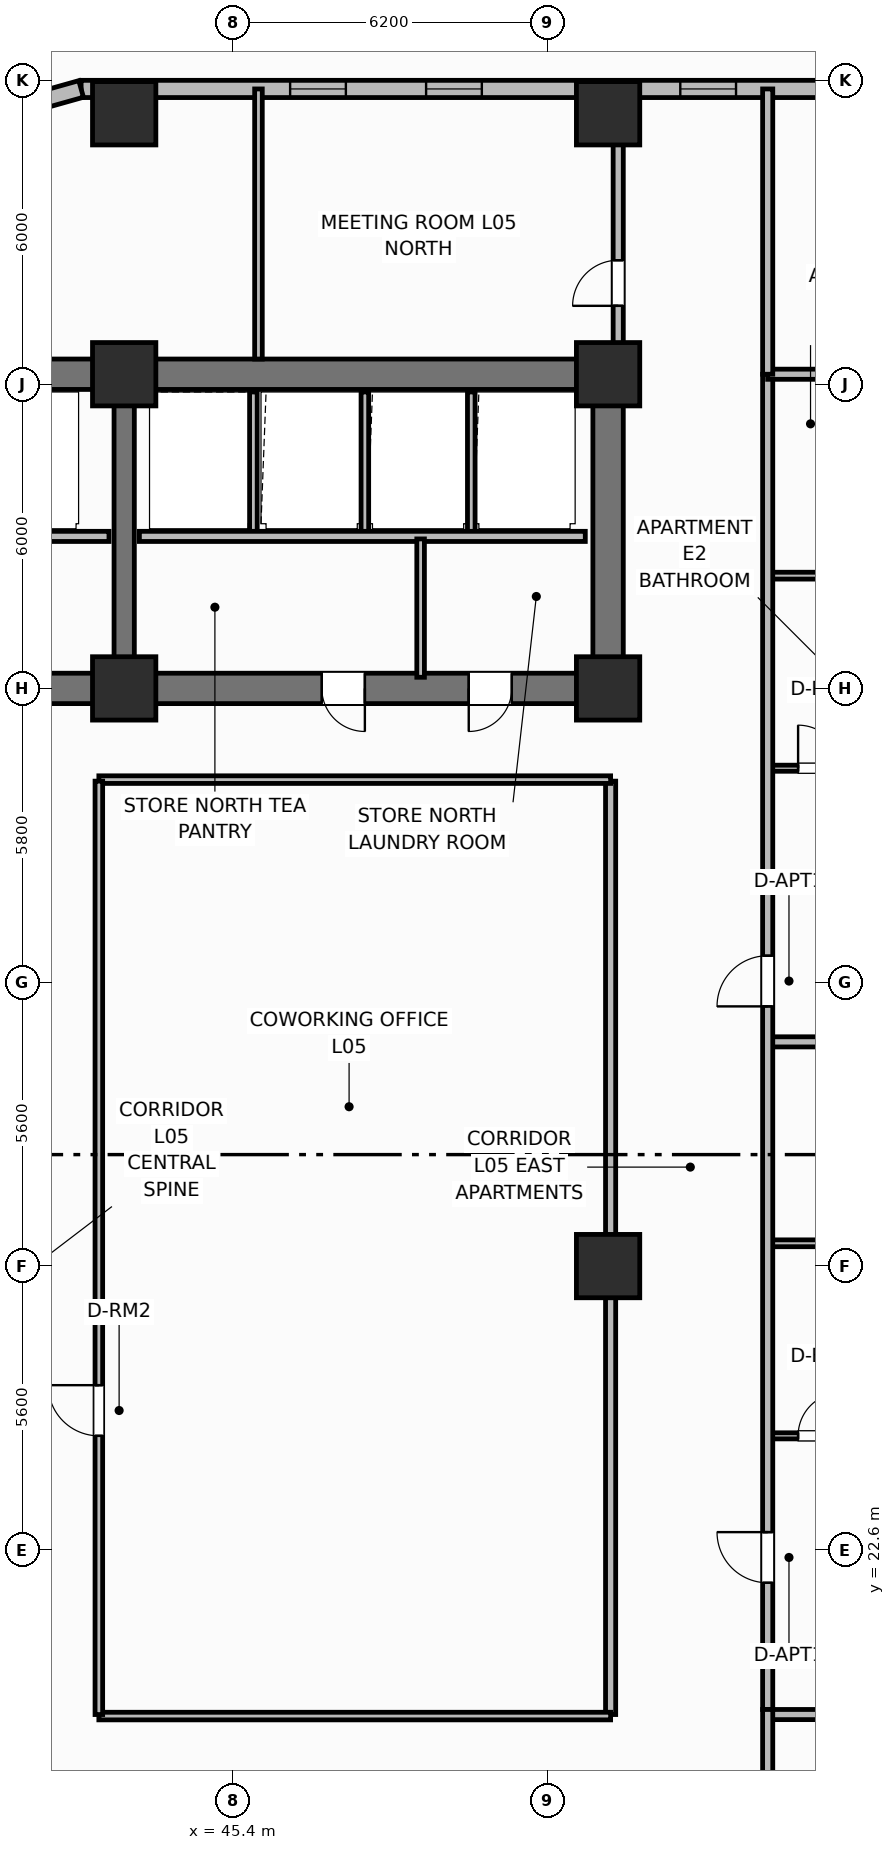
"""IFC4 building model, lengths in metres.
Left out: names, types, materials, properties, quantities, classifications, styles, units other than length and angle.
Written with IfcOpenShell. Run it as: python <this file> out.ifc"""

import sys

from ifc_helpers import new_model, si_unit, direction, frame, frame_2d, origin, origin_2d, place, context, subcontext, project, spatial, rectangle, extrude, element, fill, save


model = new_model("IFC4")
c1 = context("Model", 3, precision=1e-05, world=origin(), true_north=direction((0.0, 1.0)))
c2 = subcontext(c1, "Body", "Model", "MODEL_VIEW")
j1 = project(units=[si_unit("LENGTHUNIT", "METRE"), si_unit("PLANEANGLEUNIT", "RADIAN")], contexts=[c1])
p1 = place(None, origin())
s1 = spatial("IfcSite", under=j1, at=p1, CompositionType="ELEMENT")
p2 = place(p1, origin())
s2 = spatial("IfcBuilding", under=s1, at=p2, CompositionType="ELEMENT")
p3 = place(p2, frame((0.0, 0.0, 24.6)))
s3 = spatial("IfcBuildingStorey", under=s2, at=p3, CompositionType="ELEMENT", Elevation=24.6)
p4 = place(p3, frame((25.6, 45.8, 0.0), z_axis=(0.0, 0.0, 1.0), x_axis=(1.0, 0.0, 0.0)))
e1 = element("IfcWall", 1, at=p4, inside=s3, PredefinedType="SHEAR", context=c2, shape_type="SweptSolid", body=[
    extrude(rectangle(XDim=27.2, YDim=0.6, at=frame_2d((13.6, 0.0))), origin(), (0.0, 0.0, 1.0), 4.2),
])
p5 = place(p3, frame((52.8, 39.9, 0.0), z_axis=(0.0, 0.0, 1.0), x_axis=(0.0, 1.0, 0.0)))
e2 = element("IfcWall", 2, at=p5, inside=s3, PredefinedType="SHEAR", context=c2, shape_type="SweptSolid", body=[
    extrude(rectangle(XDim=5.6, YDim=0.6, at=frame_2d((2.8, 0.0))), origin(), (0.0, 0.0, 1.0), 4.2),
])
p6 = place(p3, frame((52.8, 39.6, 0.0), z_axis=(0.0, 0.0, 1.0), x_axis=(-1.0, 0.0, 0.0)))
e3 = element("IfcWall", 3, at=p6, inside=s3, PredefinedType="SHEAR", context=c2, shape_type="SweptSolid", body=[
    extrude(rectangle(XDim=27.2, YDim=0.6, at=frame_2d((13.6, 0.0))), origin(), (0.0, 0.0, 1.0), 4.2),
])
p7 = place(p6, frame((24.2, 0.0, 0.0)))
e4 = element("IfcOpeningElement", 4, at=p7, cuts=e3, PredefinedType="OPENING", context=c2, shape_type="SweptSolid", body=[
    extrude(rectangle(XDim=1.1, YDim=2.15, at=frame_2d((0.55, 1.075))), frame((0.0, 0.31, 0.0), z_axis=(0.0, -1.0, 0.0), x_axis=(1.0, 0.0, 0.0)), (0.0, 0.0, 1.0), 0.62),
])
p8 = place(p6, frame((20.55, 0.0, 0.0)))
e5 = element("IfcOpeningElement", 5, at=p8, cuts=e3, PredefinedType="OPENING", context=c2, shape_type="SweptSolid", body=[
    extrude(rectangle(XDim=0.95, YDim=2.1, at=frame_2d((0.475, 1.05))), frame((0.0, 0.31, 0.0), z_axis=(0.0, -1.0, 0.0), x_axis=(1.0, 0.0, 0.0)), (0.0, 0.0, 1.0), 0.62),
])
p9 = place(p6, frame((15.1, 0.0, 0.0)))
e6 = element("IfcOpeningElement", 6, at=p9, cuts=e3, PredefinedType="OPENING", context=c2, shape_type="SweptSolid", body=[
    extrude(rectangle(XDim=1.2, YDim=2.15, at=frame_2d((0.6, 1.075))), frame((0.0, 0.31, 0.0), z_axis=(0.0, -1.0, 0.0), x_axis=(1.0, 0.0, 0.0)), (0.0, 0.0, 1.0), 0.62),
])
p10 = place(p6, frame((11.6, 0.0, 0.0)))
e7 = element("IfcOpeningElement", 7, at=p10, cuts=e3, PredefinedType="OPENING", context=c2, shape_type="SweptSolid", body=[
    extrude(rectangle(XDim=0.9, YDim=2.1, at=frame_2d((0.45, 1.05))), frame((0.0, 0.31, 0.0), z_axis=(0.0, -1.0, 0.0), x_axis=(1.0, 0.0, 0.0)), (0.0, 0.0, 1.0), 0.62),
])
p11 = place(p6, frame((4.8, 0.0, 0.0)))
e8 = element("IfcOpeningElement", 8, at=p11, cuts=e3, PredefinedType="OPENING", context=c2, shape_type="SweptSolid", body=[
    extrude(rectangle(XDim=0.85, YDim=2.1, at=frame_2d((0.425, 1.05))), frame((0.0, 0.31, 0.0), z_axis=(0.0, -1.0, 0.0), x_axis=(1.0, 0.0, 0.0)), (0.0, 0.0, 1.0), 0.62),
])
p12 = place(p6, frame((1.9, 0.0, 0.0)))
e9 = element("IfcOpeningElement", 9, at=p12, cuts=e3, PredefinedType="OPENING", context=c2, shape_type="SweptSolid", body=[
    extrude(rectangle(XDim=0.85, YDim=2.1, at=frame_2d((0.425, 1.05))), frame((0.0, 0.31, 0.0), z_axis=(0.0, -1.0, 0.0), x_axis=(1.0, 0.0, 0.0)), (0.0, 0.0, 1.0), 0.62),
])
p13 = place(p3, frame((43.25, 39.9, 0.0), z_axis=(0.0, 0.0, 1.0), x_axis=(0.0, 1.0, 0.0)))
e10 = element("IfcWall", 10, at=p13, inside=s3, PredefinedType="SHEAR", context=c2, shape_type="SweptSolid", body=[
    extrude(rectangle(XDim=5.6, YDim=0.4, at=frame_2d((2.8, 0.0))), origin(), (0.0, 0.0, 1.0), 4.2),
])
for number, where, z_axis, x_axis in (
    (11, (43.25, 39.6, 0.0), (0.0, 0.0, 1.0), (1.0, 0.0, 0.0)),
    (12, (43.25, 45.8, 0.0), (0.0, 0.0, 1.0), (1.0, 0.0, 0.0)),
    (13, (52.8, 39.6, 0.0), (0.0, 0.0, 1.0), (1.0, 0.0, 0.0)),
    (14, (52.8, 45.8, 0.0), (0.0, 0.0, 1.0), (1.0, 0.0, 0.0)),
    (15, (52.8, 28.2, 0.0), (0.0, 0.0, 1.0), (1.0, 0.0, 0.0)),
    (16, (43.25, 50.95, 0.0), (0.0, 0.0, 1.0), (1.0, 0.0, 0.0)),
    (17, (52.8, 50.95, 0.0), (0.0, 0.0, 1.0), (1.0, 0.0, 0.0)),
):
    element("IfcColumn", number, at=place(p3, frame(where, z_axis=z_axis, x_axis=x_axis)), inside=s3, PredefinedType="COLUMN", context=c2, shape_type="SweptSolid", body=[
        extrude(rectangle(XDim=1.25, YDim=1.25, at=origin_2d()), origin(), (0.0, 0.0, 1.0), 4.2),
    ])
p14 = place(p3, frame((59.8, 51.43, 0.0), z_axis=(0.0, 0.0, 1.0), x_axis=(-1.0, 0.0, 0.0)))
e18 = element("IfcWall", 18, at=p14, inside=s3, PredefinedType="SOLIDWALL", context=c2, shape_type="SweptSolid", body=[
    extrude(rectangle(XDim=17.4, YDim=0.34, at=frame_2d((8.7, 0.0))), origin(), (0.0, 0.0, 1.0), 3.2),
])
p15 = place(p14, frame((1.442, 0.0, 0.95)))
e19 = element("IfcOpeningElement", 19, at=p15, cuts=e18, PredefinedType="OPENING", context=c2, shape_type="SweptSolid", body=[
    extrude(rectangle(XDim=1.1, YDim=1.65, at=frame_2d((0.55, 0.825))), frame((0.0, 0.18, 0.0), z_axis=(0.0, -1.0, 0.0), x_axis=(1.0, 0.0, 0.0)), (0.0, 0.0, 1.0), 0.36),
])
p16 = place(p14, frame((4.475, 0.0, 0.95)))
e20 = element("IfcOpeningElement", 20, at=p16, cuts=e18, PredefinedType="OPENING", context=c2, shape_type="SweptSolid", body=[
    extrude(rectangle(XDim=1.1, YDim=1.65, at=frame_2d((0.55, 0.825))), frame((0.0, 0.18, 0.0), z_axis=(0.0, -1.0, 0.0), x_axis=(1.0, 0.0, 0.0)), (0.0, 0.0, 1.0), 0.36),
])
p17 = place(p14, frame((9.492, 0.0, 0.95)))
e21 = element("IfcOpeningElement", 21, at=p17, cuts=e18, PredefinedType="OPENING", context=c2, shape_type="SweptSolid", body=[
    extrude(rectangle(XDim=1.1, YDim=1.65, at=frame_2d((0.55, 0.825))), frame((0.0, 0.18, 0.0), z_axis=(0.0, -1.0, 0.0), x_axis=(1.0, 0.0, 0.0)), (0.0, 0.0, 1.0), 0.36),
])
p18 = place(p14, frame((12.175, 0.0, 0.95)))
e22 = element("IfcOpeningElement", 22, at=p18, cuts=e18, PredefinedType="OPENING", context=c2, shape_type="SweptSolid", body=[
    extrude(rectangle(XDim=1.1, YDim=1.65, at=frame_2d((0.55, 0.825))), frame((0.0, 0.18, 0.0), z_axis=(0.0, -1.0, 0.0), x_axis=(1.0, 0.0, 0.0)), (0.0, 0.0, 1.0), 0.36),
])
p19 = place(p3, frame((42.4, 51.43, 0.0), z_axis=(0.0, 0.0, 1.0), x_axis=(-0.962652136636, -0.270741322725, 0.0)))
e23 = element("IfcWall", 23, at=p19, inside=s3, PredefinedType="SOLIDWALL", context=c2, shape_type="SweptSolid", body=[
    extrude(rectangle(XDim=1.662, YDim=0.34, at=frame_2d((0.831, 0.0))), origin(), (0.0, 0.0, 1.0), 3.2),
])
p20 = place(p3, frame((42.95, 42.6, 0.0), z_axis=(0.0, 0.0, 1.0), x_axis=(-1.0, 0.0, 0.0)))
e24 = element("IfcWall", 24, at=p20, inside=s3, PredefinedType="PARTITIONING", context=c2, shape_type="SweptSolid", body=[
    extrude(rectangle(XDim=4.6, YDim=0.2, at=frame_2d((2.3, 0.0))), origin(), (0.0, 0.0, 1.0), 2.8),
])
for number, where, z_axis, x_axis in (
    (25, (45.8, 42.65, 0.0), (0.0, 0.0, 1.0), (0.0, 1.0, 0.0)),
    (26, (48.0, 42.65, 0.0), (0.0, 0.0, 1.0), (0.0, 1.0, 0.0)),
    (27, (50.1, 42.65, 0.0), (0.0, 0.0, 1.0), (0.0, 1.0, 0.0)),
):
    element("IfcWall", number, at=place(p3, frame(where, z_axis=z_axis, x_axis=x_axis)), inside=s3, PredefinedType="PARTITIONING", context=c2, shape_type="SweptSolid", body=[
        extrude(rectangle(XDim=2.8, YDim=0.15, at=frame_2d((1.4, 0.0))), origin(), (0.0, 0.0, 1.0), 3.03),
    ])
p21 = place(p3, frame((52.35, 42.6, 0.0), z_axis=(0.0, 0.0, 1.0), x_axis=(-1.0, 0.0, 0.0)))
e28 = element("IfcWall", 28, at=p21, inside=s3, PredefinedType="PARTITIONING", context=c2, shape_type="SweptSolid", body=[
    extrude(rectangle(XDim=8.8, YDim=0.2, at=frame_2d((4.4, 0.0))), origin(), (0.0, 0.0, 1.0), 3.03),
])
p22 = place(p3, frame((49.1, 39.82, 0.0), z_axis=(0.0, 0.0, 1.0), x_axis=(0.0, 1.0, 0.0)))
e29 = element("IfcWall", 29, at=p22, inside=s3, PredefinedType="PARTITIONING", context=c2, shape_type="SweptSolid", body=[
    extrude(rectangle(XDim=2.73, YDim=0.15, at=frame_2d((1.365, 0.0))), origin(), (0.0, 0.0, 1.0), 3.03),
])
p23 = place(p3, frame((52.85, 19.35, 0.0), z_axis=(0.0, 0.0, 1.0), x_axis=(0.0, 1.0, 0.0)))
e30 = element("IfcWall", 30, at=p23, inside=s3, PredefinedType="PARTITIONING", context=c2, shape_type="SweptSolid", body=[
    extrude(rectangle(XDim=18.42, YDim=0.2, at=frame_2d((9.21, 0.0))), origin(), (0.0, 0.0, 1.0), 3.03),
])
p24 = place(p3, frame((55.95, 19.35, 0.0), z_axis=(0.0, 0.0, 1.0), x_axis=(1.0, 0.0, 0.0)))
e31 = element("IfcWall", 31, at=p24, inside=s3, PredefinedType="PARTITIONING", context=c2, shape_type="SweptSolid", body=[
    extrude(rectangle(XDim=7.88, YDim=0.2, at=frame_2d((3.94, 0.0))), origin(), (0.0, 0.0, 1.0), 3.03),
])
for number, where, z_axis, x_axis in (
    (32, (42.75, 19.32, 0.0), (0.0, 0.0, 1.0), (1.0, 0.0, 0.0)),
    (33, (42.75, 37.8, 0.0), (0.0, 0.0, 1.0), (1.0, 0.0, 0.0)),
):
    element("IfcWall", number, at=place(p3, frame(where, z_axis=z_axis, x_axis=x_axis)), inside=s3, PredefinedType="PARTITIONING", context=c2, shape_type="SweptSolid", body=[
        extrude(rectangle(XDim=10.1, YDim=0.15, at=frame_2d((5.05, 0.0))), origin(), (0.0, 0.0, 1.0), 3.03),
    ])
p25 = place(p3, frame((42.75, 19.35, 0.0), z_axis=(0.0, 0.0, 1.0), x_axis=(0.0, 1.0, 0.0)))
e34 = element("IfcWall", 34, at=p25, inside=s3, PredefinedType="PARTITIONING", context=c2, shape_type="SweptSolid", body=[
    extrude(rectangle(XDim=18.42, YDim=0.15, at=frame_2d((9.21, 0.0))), origin(), (0.0, 0.0, 1.0), 3.03),
])
p26 = place(p25, frame((5.5, 0.0, 0.0)))
e35 = element("IfcOpeningElement", 35, at=p26, cuts=e34, PredefinedType="OPENING", context=c2, shape_type="SweptSolid", body=[
    extrude(rectangle(XDim=1.0, YDim=2.15, at=frame_2d((0.5, 1.075))), frame((0.0, 0.085, 0.0), z_axis=(0.0, -1.0, 0.0), x_axis=(1.0, 0.0, 0.0)), (0.0, 0.0, 1.0), 0.17),
])
p27 = place(p3, frame((55.95, 24.85, 0.0), z_axis=(0.0, 0.0, 1.0), x_axis=(1.0, 0.0, 0.0)))
e36 = element("IfcWall", 36, at=p27, inside=s3, PredefinedType="PARTITIONING", context=c2, shape_type="SweptSolid", body=[
    extrude(rectangle(XDim=2.25, YDim=0.12, at=frame_2d((1.125, 0.0))), origin(), (0.0, 0.0, 1.0), 3.03),
])
p28 = place(p27, frame((0.6, 0.0, 0.0)))
e37 = element("IfcOpeningElement", 37, at=p28, cuts=e36, PredefinedType="OPENING", context=c2, shape_type="SweptSolid", body=[
    extrude(rectangle(XDim=0.85, YDim=2.1, at=frame_2d((0.425, 1.05))), frame((0.0, 0.07, 0.0), z_axis=(0.0, -1.0, 0.0), x_axis=(1.0, 0.0, 0.0)), (0.0, 0.0, 1.0), 0.14),
])
p29 = place(p3, frame((55.95, 28.65, 0.0), z_axis=(0.0, 0.0, 1.0), x_axis=(1.0, 0.0, 0.0)))
e38 = element("IfcWall", 38, at=p29, inside=s3, PredefinedType="PARTITIONING", context=c2, shape_type="SweptSolid", body=[
    extrude(rectangle(XDim=2.25, YDim=0.135, at=frame_2d((1.125, 0.0))), origin(), (0.0, 0.0, 1.0), 3.03),
])
p30 = place(p3, frame((55.95, 32.625, 0.0), z_axis=(0.0, 0.0, 1.0), x_axis=(1.0, 0.0, 0.0)))
e39 = element("IfcWall", 39, at=p30, inside=s3, PredefinedType="PARTITIONING", context=c2, shape_type="SweptSolid", body=[
    extrude(rectangle(XDim=7.88, YDim=0.2, at=frame_2d((3.94, 0.0))), origin(), (0.0, 0.0, 1.0), 3.03),
])
p31 = place(p3, frame((55.95, 38.025, 0.0), z_axis=(0.0, 0.0, 1.0), x_axis=(1.0, 0.0, 0.0)))
e40 = element("IfcWall", 40, at=p31, inside=s3, PredefinedType="PARTITIONING", context=c2, shape_type="SweptSolid", body=[
    extrude(rectangle(XDim=2.25, YDim=0.12, at=frame_2d((1.125, 0.0))), origin(), (0.0, 0.0, 1.0), 3.03),
])
p32 = place(p31, frame((0.6, 0.0, 0.0)))
e41 = element("IfcOpeningElement", 41, at=p32, cuts=e40, PredefinedType="OPENING", context=c2, shape_type="SweptSolid", body=[
    extrude(rectangle(XDim=0.85, YDim=2.1, at=frame_2d((0.425, 1.05))), frame((0.0, 0.07, 0.0), z_axis=(0.0, -1.0, 0.0), x_axis=(1.0, 0.0, 0.0)), (0.0, 0.0, 1.0), 0.14),
])
p33 = place(p3, frame((55.95, 41.825, 0.0), z_axis=(0.0, 0.0, 1.0), x_axis=(1.0, 0.0, 0.0)))
e42 = element("IfcWall", 42, at=p33, inside=s3, PredefinedType="PARTITIONING", context=c2, shape_type="SweptSolid", body=[
    extrude(rectangle(XDim=2.25, YDim=0.135, at=frame_2d((1.125, 0.0))), origin(), (0.0, 0.0, 1.0), 3.03),
])
p34 = place(p3, frame((55.95, 19.45, 0.0), z_axis=(0.0, 0.0, 1.0), x_axis=(0.0, 1.0, 0.0)))
e43 = element("IfcWall", 43, at=p34, inside=s3, PredefinedType="PARTITIONING", context=c2, shape_type="SweptSolid", body=[
    extrude(rectangle(XDim=26.35, YDim=0.2, at=frame_2d((13.175, 0.0))), origin(), (0.0, 0.0, 1.0), 3.03),
])
p35 = place(p34, frame((2.5, 0.0, 0.0)))
e44 = element("IfcOpeningElement", 44, at=p35, cuts=e43, PredefinedType="OPENING", context=c2, shape_type="SweptSolid", body=[
    extrude(rectangle(XDim=1.0, YDim=2.15, at=frame_2d((0.5, 1.075))), frame((0.0, 0.11, 0.0), z_axis=(0.0, -1.0, 0.0), x_axis=(1.0, 0.0, 0.0)), (0.0, 0.0, 1.0), 0.22),
])
p36 = place(p34, frame((13.875, 0.0, 0.0)))
e45 = element("IfcOpeningElement", 45, at=p36, cuts=e43, PredefinedType="OPENING", context=c2, shape_type="SweptSolid", body=[
    extrude(rectangle(XDim=1.0, YDim=2.15, at=frame_2d((0.5, 1.075))), frame((0.0, 0.11, 0.0), z_axis=(0.0, -1.0, 0.0), x_axis=(1.0, 0.0, 0.0)), (0.0, 0.0, 1.0), 0.22),
])
p37 = place(p3, frame((55.95, 45.8, 0.0), z_axis=(0.0, 0.0, 1.0), x_axis=(1.0, 0.0, 0.0)))
e46 = element("IfcWall", 46, at=p37, inside=s3, PredefinedType="PARTITIONING", context=c2, shape_type="SweptSolid", body=[
    extrude(rectangle(XDim=7.46, YDim=0.2, at=frame_2d((3.73, 0.0))), origin(), (0.0, 0.0, 1.0), 3.03),
])
p38 = place(p3, frame((55.95, 4.97, 0.0), z_axis=(0.0, 0.0, 1.0), x_axis=(0.0, 1.0, 0.0)))
e47 = element("IfcWall", 47, at=p38, inside=s3, PredefinedType="PARTITIONING", context=c2, shape_type="SweptSolid", body=[
    extrude(rectangle(XDim=14.48, YDim=0.2, at=frame_2d((7.24, 0.0))), origin(), (0.0, 0.0, 1.0), 3.03),
])
p39 = place(p3, frame((55.95, 45.8, 0.0), z_axis=(0.0, 0.0, 1.0), x_axis=(0.0, 1.0, 0.0)))
e48 = element("IfcWall", 48, at=p39, inside=s3, PredefinedType="PARTITIONING", context=c2, shape_type="SweptSolid", body=[
    extrude(rectangle(XDim=5.63, YDim=0.2, at=frame_2d((2.815, 0.0))), origin(), (0.0, 0.0, 1.0), 3.03),
])
p40 = place(p3, frame((45.9, 46.1, 0.0), z_axis=(0.0, 0.0, 1.0), x_axis=(0.0, 1.0, 0.0)))
e49 = element("IfcWall", 49, at=p40, inside=s3, PredefinedType="PARTITIONING", context=c2, shape_type="SweptSolid", body=[
    extrude(rectangle(XDim=5.33, YDim=0.15, at=frame_2d((2.665, 0.0))), origin(), (0.0, 0.0, 1.0), 3.03),
])
p41 = place(p3, frame((53.0, 46.1, 0.0), z_axis=(0.0, 0.0, 1.0), x_axis=(0.0, 1.0, 0.0)))
e50 = element("IfcWall", 50, at=p41, inside=s3, PredefinedType="PARTITIONING", context=c2, shape_type="SweptSolid", body=[
    extrude(rectangle(XDim=4.83, YDim=0.2, at=frame_2d((2.415, 0.0))), origin(), (0.0, 0.0, 1.0), 3.03),
])
p42 = place(p41, frame((1.05, 0.0, 0.0)))
e51 = element("IfcOpeningElement", 51, at=p42, cuts=e50, PredefinedType="OPENING", context=c2, shape_type="SweptSolid", body=[
    extrude(rectangle(XDim=0.9, YDim=2.1, at=frame_2d((0.45, 1.05))), frame((0.0, 0.11, 0.0), z_axis=(0.0, -1.0, 0.0), x_axis=(1.0, 0.0, 0.0)), (0.0, 0.0, 1.0), 0.22),
])
p43 = place(p16, origin())
e52 = element("IfcWindow", 52, at=p43, inside=s3, PartitioningType="SINGLE_PANEL", PredefinedType="WINDOW", context=c2, shape_type="SweptSolid", body=[
    extrude(rectangle(XDim=1.1, YDim=1.65, at=frame_2d((0.55, 0.825))), frame((0.0, 0.03, 0.0), z_axis=(0.0, -1.0, 0.0), x_axis=(1.0, 0.0, 0.0)), (0.0, 0.0, 1.0), 0.06),
])
fill(e20, e52)
p44 = place(p17, origin())
e53 = element("IfcWindow", 53, at=p44, inside=s3, PartitioningType="SINGLE_PANEL", PredefinedType="WINDOW", context=c2, shape_type="SweptSolid", body=[
    extrude(rectangle(XDim=1.1, YDim=1.65, at=frame_2d((0.55, 0.825))), frame((0.0, 0.03, 0.0), z_axis=(0.0, -1.0, 0.0), x_axis=(1.0, 0.0, 0.0)), (0.0, 0.0, 1.0), 0.06),
])
fill(e21, e53)
p45 = place(p18, origin())
e54 = element("IfcWindow", 54, at=p45, inside=s3, PartitioningType="SINGLE_PANEL", PredefinedType="WINDOW", context=c2, shape_type="SweptSolid", body=[
    extrude(rectangle(XDim=1.1, YDim=1.65, at=frame_2d((0.55, 0.825))), frame((0.0, 0.03, 0.0), z_axis=(0.0, -1.0, 0.0), x_axis=(1.0, 0.0, 0.0)), (0.0, 0.0, 1.0), 0.06),
])
fill(e22, e54)
p46 = place(p26, origin())
e55 = element("IfcDoor", 55, at=p46, inside=s3, OperationType="SINGLE_SWING_RIGHT", PredefinedType="DOOR", context=c2, shape_type="SweptSolid", body=[
    extrude(rectangle(XDim=1.0, YDim=2.15, at=frame_2d((0.5, 1.075))), frame((0.0, 0.025, 0.0), z_axis=(0.0, -1.0, 0.0), x_axis=(1.0, 0.0, 0.0)), (0.0, 0.0, 1.0), 0.05),
])
fill(e35, e55)
p47 = place(p28, origin())
e56 = element("IfcDoor", 56, at=p47, inside=s3, OperationType="SINGLE_SWING_RIGHT", PredefinedType="DOOR", context=c2, shape_type="SweptSolid", body=[
    extrude(rectangle(XDim=0.85, YDim=2.1, at=frame_2d((0.425, 1.05))), frame((0.0, 0.025, 0.0), z_axis=(0.0, -1.0, 0.0), x_axis=(1.0, 0.0, 0.0)), (0.0, 0.0, 1.0), 0.05),
])
fill(e37, e56)
p48 = place(p32, origin())
e57 = element("IfcDoor", 57, at=p48, inside=s3, OperationType="SINGLE_SWING_LEFT", PredefinedType="DOOR", context=c2, shape_type="SweptSolid", body=[
    extrude(rectangle(XDim=0.85, YDim=2.1, at=frame_2d((0.425, 1.05))), frame((0.0, 0.025, 0.0), z_axis=(0.0, -1.0, 0.0), x_axis=(1.0, 0.0, 0.0)), (0.0, 0.0, 1.0), 0.05),
])
fill(e41, e57)
p49 = place(p35, origin())
e58 = element("IfcDoor", 58, at=p49, inside=s3, OperationType="SINGLE_SWING_RIGHT", PredefinedType="DOOR", context=c2, shape_type="SweptSolid", body=[
    extrude(rectangle(XDim=1.0, YDim=2.15, at=frame_2d((0.5, 1.075))), frame((0.0, 0.025, 0.0), z_axis=(0.0, -1.0, 0.0), x_axis=(1.0, 0.0, 0.0)), (0.0, 0.0, 1.0), 0.05),
])
fill(e44, e58)
p50 = place(p36, origin())
e59 = element("IfcDoor", 59, at=p50, inside=s3, OperationType="SINGLE_SWING_LEFT", PredefinedType="DOOR", context=c2, shape_type="SweptSolid", body=[
    extrude(rectangle(XDim=1.0, YDim=2.15, at=frame_2d((0.5, 1.075))), frame((0.0, 0.025, 0.0), z_axis=(0.0, -1.0, 0.0), x_axis=(1.0, 0.0, 0.0)), (0.0, 0.0, 1.0), 0.05),
])
fill(e45, e59)
p51 = place(p42, origin())
e60 = element("IfcDoor", 60, at=p51, inside=s3, OperationType="SINGLE_SWING_LEFT", PredefinedType="DOOR", context=c2, shape_type="SweptSolid", body=[
    extrude(rectangle(XDim=0.9, YDim=2.1, at=frame_2d((0.45, 1.05))), frame((0.0, 0.025, 0.0), z_axis=(0.0, -1.0, 0.0), x_axis=(1.0, 0.0, 0.0)), (0.0, 0.0, 1.0), 0.05),
])
fill(e51, e60)
p52 = place(p11, origin())
e61 = element("IfcDoor", 61, at=p52, inside=s3, OperationType="SINGLE_SWING_LEFT", PredefinedType="DOOR", context=c2, shape_type="SweptSolid", body=[
    extrude(rectangle(XDim=0.85, YDim=2.1, at=frame_2d((0.425, 1.05))), frame((0.0, 0.025, 0.0), z_axis=(0.0, -1.0, 0.0), x_axis=(1.0, 0.0, 0.0)), (0.0, 0.0, 1.0), 0.05),
])
fill(e8, e61)
p53 = place(p12, origin())
e62 = element("IfcDoor", 62, at=p53, inside=s3, OperationType="SINGLE_SWING_RIGHT", PredefinedType="DOOR", context=c2, shape_type="SweptSolid", body=[
    extrude(rectangle(XDim=0.85, YDim=2.1, at=frame_2d((0.425, 1.05))), frame((0.0, 0.025, 0.0), z_axis=(0.0, -1.0, 0.0), x_axis=(1.0, 0.0, 0.0)), (0.0, 0.0, 1.0), 0.05),
])
fill(e9, e62)
save(model, sys.argv[1])
